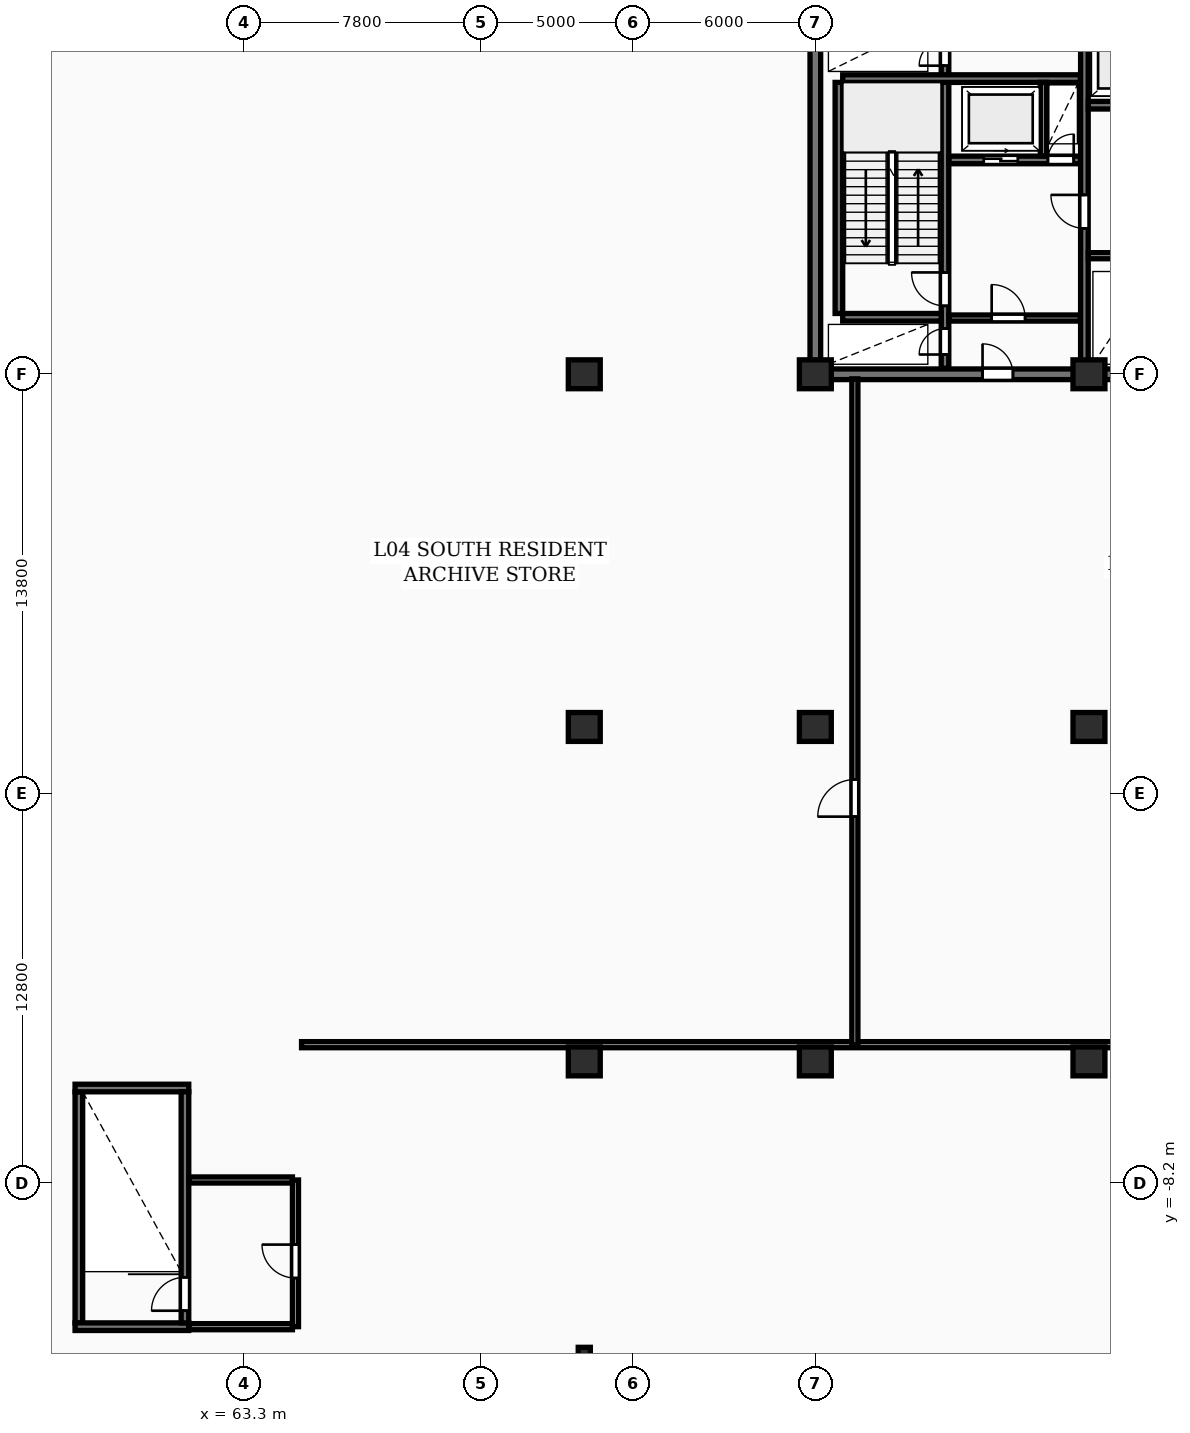
"""IFC4 building model, lengths in metres.
Left out: names, types, materials, properties, quantities, classifications, styles, units other than length and angle.
Written with IfcOpenShell. Run it as: python <this file> out.ifc"""

import sys

from ifc_helpers import new_model, si_unit, direction, frame, frame_2d, origin, origin_2d, place, context, subcontext, project, spatial, rectangle, i_section, extrude, element, fill, save


model = new_model("IFC4")
c1 = context("Model", 3, precision=1e-05, world=origin(), true_north=direction((0.0, 1.0)))
c2 = subcontext(c1, "Body", "Model", "MODEL_VIEW")
j1 = project(units=[si_unit("LENGTHUNIT", "METRE"), si_unit("PLANEANGLEUNIT", "RADIAN")], contexts=[c1])
p1 = place(None, origin())
s1 = spatial("IfcSite", under=j1, at=p1, CompositionType="ELEMENT")
p2 = place(p1, origin())
s2 = spatial("IfcBuilding", under=s1, at=p2, CompositionType="ELEMENT")
p3 = place(p2, frame((0.0, 0.0, 19.0)))
s3 = spatial("IfcBuildingStorey", under=s2, at=p3, CompositionType="ELEMENT", Elevation=19.0)
for number, where, z_axis, x_axis in (
    (1, (74.5, -4.2, 0.0), (0.0, 0.0, 1.0), (1.0, 0.0, 0.0)),
    (2, (74.5, 6.8, 0.0), (0.0, 0.0, 1.0), (1.0, 0.0, 0.0)),
    (3, (74.5, 18.4, 0.0), (0.0, 0.0, 1.0), (1.0, 0.0, 0.0)),
    (4, (82.1, -4.2, 0.0), (0.0, 0.0, 1.0), (1.0, 0.0, 0.0)),
    (5, (82.1, 6.8, 0.0), (0.0, 0.0, 1.0), (1.0, 0.0, 0.0)),
    (6, (82.1, 18.4, 0.0), (0.0, 0.0, 1.0), (1.0, 0.0, 0.0)),
    (7, (91.1, -4.2, 0.0), (0.0, 0.0, 1.0), (1.0, 0.0, 0.0)),
    (8, (91.1, 6.8, 0.0), (0.0, 0.0, 1.0), (1.0, 0.0, 0.0)),
    (9, (91.1, 18.4, 0.0), (0.0, 0.0, 1.0), (1.0, 0.0, 0.0)),
):
    element("IfcColumn", number, at=place(p3, frame(where, z_axis=z_axis, x_axis=x_axis)), inside=s3, PredefinedType="COLUMN", context=c2, shape_type="SweptSolid", body=[
        extrude(rectangle(XDim=1.05, YDim=0.95, at=origin_2d()), origin(), (0.0, 0.0, 1.0), 5.0),
    ])
p4 = place(p3, frame((74.5, -13.8, 0.0), z_axis=(0.0, 0.0, 1.0), x_axis=(1.0, 0.0, 0.0)))
e10 = element("IfcColumn", 10, at=p4, inside=s3, PredefinedType="COLUMN", context=c2, shape_type="SweptSolid", body=[
    extrude(i_section(OverallWidth=0.399, OverallDepth=0.394, WebThickness=0.023, FlangeThickness=0.037, FilletRadius=0.015, at=origin_2d()), origin(), (0.0, 0.0, 1.0), 5.0),
])
p5 = place(p3, frame((82.1, 18.575, 0.0), z_axis=(0.0, 0.0, 1.0), x_axis=(0.0, 1.0, 0.0)))
e11 = element("IfcWall", 11, at=p5, inside=s3, PredefinedType="SHEAR", context=c2, shape_type="SweptSolid", body=[
    extrude(rectangle(XDim=11.65, YDim=0.35, at=frame_2d((5.825, 0.0))), origin(), (0.0, 0.0, 1.0), 5.0),
])
p6 = place(p3, frame((81.925, 18.4, 0.0), z_axis=(0.0, 0.0, 1.0), x_axis=(1.0, 0.0, 0.0)))
e12 = element("IfcWall", 12, at=p6, inside=s3, PredefinedType="SHEAR", context=c2, shape_type="SweptSolid", body=[
    extrude(rectangle(XDim=36.265, YDim=0.35, at=frame_2d((18.132, 0.0))), origin(), (0.0, 0.0, 1.0), 5.0),
])
p7 = place(p6, frame((5.675, 0.0, 0.0)))
e13 = element("IfcOpeningElement", 13, at=p7, cuts=e12, PredefinedType="OPENING", context=c2, shape_type="SweptSolid", body=[
    extrude(rectangle(XDim=1.0, YDim=2.15, at=frame_2d((0.5, 1.075))), frame((0.0, 0.185, 0.0), z_axis=(0.0, -1.0, 0.0), x_axis=(1.0, 0.0, 0.0)), (0.0, 0.0, 1.0), 0.37),
])
p8 = place(p6, frame((21.925, 0.0, 0.0)))
e14 = element("IfcOpeningElement", 14, at=p8, cuts=e12, PredefinedType="OPENING", context=c2, shape_type="SweptSolid", body=[
    extrude(rectangle(XDim=1.5, YDim=2.2, at=frame_2d((0.75, 1.1))), frame((0.0, 0.185, 0.0), z_axis=(0.0, -1.0, 0.0), x_axis=(1.0, 0.0, 0.0)), (0.0, 0.0, 1.0), 0.37),
])
p9 = place(p6, frame((29.875, 0.0, 0.0)))
e15 = element("IfcOpeningElement", 15, at=p9, cuts=e12, PredefinedType="OPENING", context=c2, shape_type="SweptSolid", body=[
    extrude(rectangle(XDim=1.0, YDim=2.15, at=frame_2d((0.5, 1.075))), frame((0.0, 0.185, 0.0), z_axis=(0.0, -1.0, 0.0), x_axis=(1.0, 0.0, 0.0)), (0.0, 0.0, 1.0), 0.37),
])
p10 = place(p3, frame((82.875, 20.4, 0.0), z_axis=(0.0, 0.0, 1.0), x_axis=(0.0, 1.0, 0.0)))
e16 = element("IfcWall", 16, at=p10, inside=s3, PredefinedType="SHEAR", context=c2, shape_type="SweptSolid", body=[
    extrude(rectangle(XDim=7.6, YDim=0.25, at=frame_2d((3.8, 0.0))), origin(), (0.0, 0.0, 1.0), 5.0),
])
p11 = place(p3, frame((86.365, 18.6, 0.0), z_axis=(0.0, 0.0, 1.0), x_axis=(0.0, 1.0, 0.0)))
e17 = element("IfcWall", 17, at=p11, inside=s3, PredefinedType="SHEAR", context=c2, shape_type="SweptSolid", body=[
    extrude(rectangle(XDim=11.6, YDim=0.25, at=frame_2d((5.8, 0.0))), origin(), (0.0, 0.0, 1.0), 5.0),
])
p12 = place(p11, frame((0.45, 0.0, 0.0)))
e18 = element("IfcOpeningElement", 18, at=p12, cuts=e17, PredefinedType="OPENING", context=c2, shape_type="SweptSolid", body=[
    extrude(rectangle(XDim=0.85, YDim=2.05, at=frame_2d((0.425, 1.025))), frame((0.0, 0.135, 0.0), z_axis=(0.0, -1.0, 0.0), x_axis=(1.0, 0.0, 0.0)), (0.0, 0.0, 1.0), 0.27),
])
p13 = place(p11, frame((2.05, 0.0, 0.0)))
e19 = element("IfcOpeningElement", 19, at=p13, cuts=e17, PredefinedType="OPENING", context=c2, shape_type="SweptSolid", body=[
    extrude(rectangle(XDim=1.1, YDim=2.1, at=frame_2d((0.55, 1.05))), frame((0.0, 0.135, 0.0), z_axis=(0.0, -1.0, 0.0), x_axis=(1.0, 0.0, 0.0)), (0.0, 0.0, 1.0), 0.27),
])
p14 = place(p11, frame((9.95, 0.0, 0.0)))
e20 = element("IfcOpeningElement", 20, at=p14, cuts=e17, PredefinedType="OPENING", context=c2, shape_type="SweptSolid", body=[
    extrude(rectangle(XDim=0.85, YDim=2.05, at=frame_2d((0.425, 1.025))), frame((0.0, 0.135, 0.0), z_axis=(0.0, -1.0, 0.0), x_axis=(1.0, 0.0, 0.0)), (0.0, 0.0, 1.0), 0.27),
])
p15 = place(p3, frame((83.0, 20.275, 0.0), z_axis=(0.0, 0.0, 1.0), x_axis=(1.0, 0.0, 0.0)))
e21 = element("IfcWall", 21, at=p15, inside=s3, PredefinedType="SHEAR", context=c2, shape_type="SweptSolid", body=[
    extrude(rectangle(XDim=3.24, YDim=0.25, at=frame_2d((1.62, 0.0))), origin(), (0.0, 0.0, 1.0), 5.0),
])
p16 = place(p3, frame((83.0, 28.125, 0.0), z_axis=(0.0, 0.0, 1.0), x_axis=(1.0, 0.0, 0.0)))
e22 = element("IfcWall", 22, at=p16, inside=s3, PredefinedType="SHEAR", context=c2, shape_type="SweptSolid", body=[
    extrude(rectangle(XDim=7.82, YDim=0.25, at=frame_2d((3.91, 0.0))), origin(), (0.0, 0.0, 1.0), 5.0),
])
p17 = place(p3, frame((86.5, 25.45, 0.0), z_axis=(0.0, 0.0, 1.0), x_axis=(1.0, 0.0, 0.0)))
e23 = element("IfcWall", 23, at=p17, inside=s3, PredefinedType="SHEAR", context=c2, shape_type="SweptSolid", body=[
    extrude(rectangle(XDim=4.32, YDim=0.25, at=frame_2d((2.16, 0.0))), origin(), (0.0, 0.0, 1.0), 5.0),
])
p18 = place(p17, frame((1.14, 0.0, 0.0)))
e24 = element("IfcOpeningElement", 24, at=p18, cuts=e23, PredefinedType="OPENING", context=c2, shape_type="SweptSolid", body=[
    extrude(rectangle(XDim=1.12, YDim=2.12, at=frame_2d((0.56, 1.06))), frame((0.0, 0.135, 0.0), z_axis=(0.0, -1.0, 0.0), x_axis=(1.0, 0.0, 0.0)), (0.0, 0.0, 1.0), 0.27),
])
p19 = place(p17, frame((3.25, 0.0, 0.0)))
e25 = element("IfcOpeningElement", 25, at=p19, cuts=e23, PredefinedType="OPENING", context=c2, shape_type="SweptSolid", body=[
    extrude(rectangle(XDim=0.85, YDim=2.05, at=frame_2d((0.425, 1.025))), frame((0.0, 0.135, 0.0), z_axis=(0.0, -1.0, 0.0), x_axis=(1.0, 0.0, 0.0)), (0.0, 0.0, 1.0), 0.27),
])
p20 = place(p3, frame((89.6, 25.58, 0.0), z_axis=(0.0, 0.0, 1.0), x_axis=(0.0, 1.0, 0.0)))
e26 = element("IfcWall", 26, at=p20, inside=s3, PredefinedType="PARTITIONING", context=c2, shape_type="SweptSolid", body=[
    extrude(rectangle(XDim=2.42, YDim=0.2, at=frame_2d((1.21, 0.0))), origin(), (0.0, 0.0, 1.0), 4.68),
])
p21 = place(p3, frame((86.5, 20.25, 0.0), z_axis=(0.0, 0.0, 1.0), x_axis=(1.0, 0.0, 0.0)))
e27 = element("IfcWall", 27, at=p21, inside=s3, PredefinedType="PARTITIONING", context=c2, shape_type="SweptSolid", body=[
    extrude(rectangle(XDim=4.32, YDim=0.2, at=frame_2d((2.16, 0.0))), origin(), (0.0, 0.0, 1.0), 4.68),
])
p22 = place(p21, frame((1.4, 0.0, 0.0)))
e28 = element("IfcOpeningElement", 28, at=p22, cuts=e27, PredefinedType="OPENING", context=c2, shape_type="SweptSolid", body=[
    extrude(rectangle(XDim=1.1, YDim=2.1, at=frame_2d((0.55, 1.05))), frame((0.0, 0.11, 0.0), z_axis=(0.0, -1.0, 0.0), x_axis=(1.0, 0.0, 0.0)), (0.0, 0.0, 1.0), 0.22),
])
p23 = place(p3, frame((90.95, 18.6, 0.0), z_axis=(0.0, 0.0, 1.0), x_axis=(0.0, 1.0, 0.0)))
e29 = element("IfcWall", 29, at=p23, inside=s3, PredefinedType="SHEAR", context=c2, shape_type="SweptSolid", body=[
    extrude(rectangle(XDim=11.6, YDim=0.25, at=frame_2d((5.8, 0.0))), origin(), (0.0, 0.0, 1.0), 5.0),
])
p24 = place(p23, frame((4.6, 0.0, 0.0)))
e30 = element("IfcOpeningElement", 30, at=p24, cuts=e29, PredefinedType="OPENING", context=c2, shape_type="SweptSolid", body=[
    extrude(rectangle(XDim=1.1, YDim=2.1, at=frame_2d((0.55, 1.05))), frame((0.0, 0.135, 0.0), z_axis=(0.0, -1.0, 0.0), x_axis=(1.0, 0.0, 0.0)), (0.0, 0.0, 1.0), 0.27),
])
p25 = place(p3, frame((91.08, 27.25, 0.0), z_axis=(0.0, 0.0, 1.0), x_axis=(1.0, 0.0, 0.0)))
e31 = element("IfcWall", 31, at=p25, inside=s3, PredefinedType="SHEAR", context=c2, shape_type="SweptSolid", body=[
    extrude(rectangle(XDim=8.34, YDim=0.25, at=frame_2d((4.17, 0.0))), origin(), (0.0, 0.0, 1.0), 5.0),
])
p26 = place(p25, frame((0.76, 0.0, 0.0)))
e32 = element("IfcOpeningElement", 32, at=p26, cuts=e31, PredefinedType="OPENING", context=c2, shape_type="SweptSolid", body=[
    extrude(rectangle(XDim=1.12, YDim=2.12, at=frame_2d((0.56, 1.06))), frame((0.0, 0.135, 0.0), z_axis=(0.0, -1.0, 0.0), x_axis=(1.0, 0.0, 0.0)), (0.0, 0.0, 1.0), 0.27),
])
p27 = place(p25, frame((3.56, 0.0, 0.0)))
e33 = element("IfcOpeningElement", 33, at=p27, cuts=e31, PredefinedType="OPENING", context=c2, shape_type="SweptSolid", body=[
    extrude(rectangle(XDim=1.12, YDim=2.12, at=frame_2d((0.56, 1.06))), frame((0.0, 0.135, 0.0), z_axis=(0.0, -1.0, 0.0), x_axis=(1.0, 0.0, 0.0)), (0.0, 0.0, 1.0), 0.27),
])
p28 = place(p25, frame((6.36, 0.0, 0.0)))
e34 = element("IfcOpeningElement", 34, at=p28, cuts=e31, PredefinedType="OPENING", context=c2, shape_type="SweptSolid", body=[
    extrude(rectangle(XDim=1.12, YDim=2.12, at=frame_2d((0.56, 1.06))), frame((0.0, 0.135, 0.0), z_axis=(0.0, -1.0, 0.0), x_axis=(1.0, 0.0, 0.0)), (0.0, 0.0, 1.0), 0.27),
])
p29 = place(p3, frame((91.08, 22.3, 0.0), z_axis=(0.0, 0.0, 1.0), x_axis=(1.0, 0.0, 0.0)))
e35 = element("IfcWall", 35, at=p29, inside=s3, PredefinedType="PARTITIONING", context=c2, shape_type="SweptSolid", body=[
    extrude(rectangle(XDim=19.14, YDim=0.2, at=frame_2d((9.57, 0.0))), origin(), (0.0, 0.0, 1.0), 4.68),
])
p30 = place(p29, frame((1.15, 0.0, 0.0)))
e36 = element("IfcOpeningElement", 36, at=p30, cuts=e35, PredefinedType="OPENING", context=c2, shape_type="SweptSolid", body=[
    extrude(rectangle(XDim=0.85, YDim=2.05, at=frame_2d((0.425, 1.025))), frame((0.0, 0.11, 0.0), z_axis=(0.0, -1.0, 0.0), x_axis=(1.0, 0.0, 0.0)), (0.0, 0.0, 1.0), 0.22),
])
p31 = place(p29, frame((3.2, 0.0, 0.0)))
e37 = element("IfcOpeningElement", 37, at=p31, cuts=e35, PredefinedType="OPENING", context=c2, shape_type="SweptSolid", body=[
    extrude(rectangle(XDim=0.85, YDim=2.05, at=frame_2d((0.425, 1.025))), frame((0.0, 0.11, 0.0), z_axis=(0.0, -1.0, 0.0), x_axis=(1.0, 0.0, 0.0)), (0.0, 0.0, 1.0), 0.22),
])
p32 = place(p29, frame((12.72, 0.0, 0.0)))
e38 = element("IfcOpeningElement", 38, at=p32, cuts=e35, PredefinedType="OPENING", context=c2, shape_type="SweptSolid", body=[
    extrude(rectangle(XDim=1.5, YDim=2.2, at=frame_2d((0.75, 1.1))), frame((0.0, 0.11, 0.0), z_axis=(0.0, -1.0, 0.0), x_axis=(1.0, 0.0, 0.0)), (0.0, 0.0, 1.0), 0.22),
])
p33 = place(p29, frame((6.42, 0.0, 0.0)))
e39 = element("IfcOpeningElement", 39, at=p33, cuts=e35, PredefinedType="OPENING", context=c2, shape_type="SweptSolid", body=[
    extrude(rectangle(XDim=0.92, YDim=2.08, at=frame_2d((0.46, 1.04))), frame((0.0, 0.11, 0.0), z_axis=(0.0, -1.0, 0.0), x_axis=(1.0, 0.0, 0.0)), (0.0, 0.0, 1.0), 0.22),
])
p34 = place(p29, frame((15.92, 0.0, 0.0)))
e40 = element("IfcOpeningElement", 40, at=p34, cuts=e35, PredefinedType="OPENING", context=c2, shape_type="SweptSolid", body=[
    extrude(rectangle(XDim=0.88, YDim=2.06, at=frame_2d((0.44, 1.03))), frame((0.0, 0.11, 0.0), z_axis=(0.0, -1.0, 0.0), x_axis=(1.0, 0.0, 0.0)), (0.0, 0.0, 1.0), 0.22),
])
p35 = place(p3, frame((57.875, -12.8, 0.0), z_axis=(0.0, 0.0, 1.0), x_axis=(0.0, 1.0, 0.0)))
e41 = element("IfcWall", 41, at=p35, inside=s3, PredefinedType="SHEAR", context=c2, shape_type="SweptSolid", body=[
    extrude(rectangle(XDim=7.6, YDim=0.25, at=frame_2d((3.8, 0.0))), origin(), (0.0, 0.0, 1.0), 5.0),
])
for number, where, z_axis, x_axis in (
    (42, (57.75, -12.925, 0.0), (0.0, 0.0, 1.0), (1.0, 0.0, 0.0)),
    (43, (57.75, -5.075, 0.0), (0.0, 0.0, 1.0), (1.0, 0.0, 0.0)),
):
    element("IfcWall", number, at=place(p3, frame(where, z_axis=z_axis, x_axis=x_axis)), inside=s3, PredefinedType="SHEAR", context=c2, shape_type="SweptSolid", body=[
        extrude(rectangle(XDim=3.74, YDim=0.25, at=frame_2d((1.87, 0.0))), origin(), (0.0, 0.0, 1.0), 5.0),
    ])
p36 = place(p3, frame((61.365, -12.8, 0.0), z_axis=(0.0, 0.0, 1.0), x_axis=(0.0, 1.0, 0.0)))
e44 = element("IfcWall", 44, at=p36, inside=s3, PredefinedType="SHEAR", context=c2, shape_type="SweptSolid", body=[
    extrude(rectangle(XDim=7.6, YDim=0.25, at=frame_2d((3.8, 0.0))), origin(), (0.0, 0.0, 1.0), 5.0),
])
p37 = place(p36, frame((0.4, 0.0, 0.0)))
e45 = element("IfcOpeningElement", 45, at=p37, cuts=e44, PredefinedType="OPENING", context=c2, shape_type="SweptSolid", body=[
    extrude(rectangle(XDim=1.1, YDim=2.1, at=frame_2d((0.55, 1.05))), frame((0.0, 0.135, 0.0), z_axis=(0.0, -1.0, 0.0), x_axis=(1.0, 0.0, 0.0)), (0.0, 0.0, 1.0), 0.27),
])
p38 = place(p3, frame((65.0, -12.925, 0.0), z_axis=(0.0, 0.0, 1.0), x_axis=(0.0, 1.0, 0.0)))
e46 = element("IfcWall", 46, at=p38, inside=s3, PredefinedType="PARTITIONING", context=c2, shape_type="SweptSolid", body=[
    extrude(rectangle(XDim=4.825, YDim=0.2, at=frame_2d((2.413, 0.0))), origin(), (0.0, 0.0, 1.0), 4.68),
])
p39 = place(p38, frame((1.6, 0.0, 0.0)))
e47 = element("IfcOpeningElement", 47, at=p39, cuts=e46, PredefinedType="OPENING", context=c2, shape_type="SweptSolid", body=[
    extrude(rectangle(XDim=1.1, YDim=2.15, at=frame_2d((0.55, 1.075))), frame((0.0, 0.11, 0.0), z_axis=(0.0, -1.0, 0.0), x_axis=(1.0, 0.0, 0.0)), (0.0, 0.0, 1.0), 0.22),
])
for number, where, z_axis, x_axis in (
    (48, (61.5, -12.925, 0.0), (0.0, 0.0, 1.0), (1.0, 0.0, 0.0)),
    (49, (61.5, -8.1, 0.0), (0.0, 0.0, 1.0), (1.0, 0.0, 0.0)),
):
    element("IfcWall", number, at=place(p3, frame(where, z_axis=z_axis, x_axis=x_axis)), inside=s3, PredefinedType="PARTITIONING", context=c2, shape_type="SweptSolid", body=[
        extrude(rectangle(XDim=3.4, YDim=0.2, at=frame_2d((1.7, 0.0))), origin(), (0.0, 0.0, 1.0), 4.68),
    ])
p40 = place(p3, frame((65.2, -3.65, 0.0), z_axis=(0.0, 0.0, 1.0), x_axis=(1.0, 0.0, 0.0)))
e50 = element("IfcWall", 50, at=p40, inside=s3, PredefinedType="PARTITIONING", context=c2, shape_type="SweptSolid", body=[
    extrude(rectangle(XDim=60.3, YDim=0.2, at=frame_2d((30.15, 0.0))), origin(), (0.0, 0.0, 1.0), 3.53),
])
p41 = place(p3, frame((83.4, -3.65, 0.0), z_axis=(0.0, 0.0, 1.0), x_axis=(0.0, 1.0, 0.0)))
e51 = element("IfcWall", 51, at=p41, inside=s3, PredefinedType="PARTITIONING", context=c2, shape_type="SweptSolid", body=[
    extrude(rectangle(XDim=21.9, YDim=0.2, at=frame_2d((10.95, 0.0))), origin(), (0.0, 0.0, 1.0), 4.68),
])
p42 = place(p41, frame((7.501, 0.0, 0.0)))
e52 = element("IfcOpeningElement", 52, at=p42, cuts=e51, PredefinedType="OPENING", context=c2, shape_type="SweptSolid", body=[
    extrude(rectangle(XDim=1.22, YDim=2.18, at=frame_2d((0.61, 1.09))), frame((0.0, 0.11, 0.0), z_axis=(0.0, -1.0, 0.0), x_axis=(1.0, 0.0, 0.0)), (0.0, 0.0, 1.0), 0.22),
])
p43 = place(p7, origin())
e53 = element("IfcDoor", 53, at=p43, inside=s3, OperationType="SINGLE_SWING_LEFT", PredefinedType="DOOR", context=c2, shape_type="SweptSolid", body=[
    extrude(rectangle(XDim=1.0, YDim=2.15, at=frame_2d((0.5, 1.075))), frame((0.0, 0.025, 0.0), z_axis=(0.0, -1.0, 0.0), x_axis=(1.0, 0.0, 0.0)), (0.0, 0.0, 1.0), 0.05),
])
fill(e13, e53)
p44 = place(p12, origin())
e54 = element("IfcDoor", 54, at=p44, inside=s3, OperationType="SINGLE_SWING_LEFT", PredefinedType="DOOR", context=c2, shape_type="SweptSolid", body=[
    extrude(rectangle(XDim=0.85, YDim=2.05, at=frame_2d((0.425, 1.025))), frame((0.0, 0.025, 0.0), z_axis=(0.0, -1.0, 0.0), x_axis=(1.0, 0.0, 0.0)), (0.0, 0.0, 1.0), 0.05),
])
fill(e18, e54)
p45 = place(p13, origin())
e55 = element("IfcDoor", 55, at=p45, inside=s3, OperationType="SINGLE_SWING_RIGHT", PredefinedType="DOOR", context=c2, shape_type="SweptSolid", body=[
    extrude(rectangle(XDim=1.1, YDim=2.1, at=frame_2d((0.55, 1.05))), frame((0.0, 0.025, 0.0), z_axis=(0.0, -1.0, 0.0), x_axis=(1.0, 0.0, 0.0)), (0.0, 0.0, 1.0), 0.05),
])
fill(e19, e55)
p46 = place(p14, origin())
e56 = element("IfcDoor", 56, at=p46, inside=s3, OperationType="SINGLE_SWING_LEFT", PredefinedType="DOOR", context=c2, shape_type="SweptSolid", body=[
    extrude(rectangle(XDim=0.85, YDim=2.05, at=frame_2d((0.425, 1.025))), frame((0.0, 0.025, 0.0), z_axis=(0.0, -1.0, 0.0), x_axis=(1.0, 0.0, 0.0)), (0.0, 0.0, 1.0), 0.05),
])
fill(e20, e56)
p47 = place(p18, origin())
e57 = element("IfcDoor", 57, at=p47, inside=s3, OperationType="SLIDING_TO_RIGHT", PredefinedType="DOOR", context=c2, shape_type="SweptSolid", body=[
    extrude(rectangle(XDim=1.12, YDim=2.12, at=frame_2d((0.56, 1.06))), frame((0.0, 0.025, 0.0), z_axis=(0.0, -1.0, 0.0), x_axis=(1.0, 0.0, 0.0)), (0.0, 0.0, 1.0), 0.05),
])
fill(e24, e57)
p48 = place(p19, origin())
e58 = element("IfcDoor", 58, at=p48, inside=s3, OperationType="SINGLE_SWING_RIGHT", PredefinedType="DOOR", context=c2, shape_type="SweptSolid", body=[
    extrude(rectangle(XDim=0.85, YDim=2.05, at=frame_2d((0.425, 1.025))), frame((0.0, 0.025, 0.0), z_axis=(0.0, -1.0, 0.0), x_axis=(1.0, 0.0, 0.0)), (0.0, 0.0, 1.0), 0.05),
])
fill(e25, e58)
p49 = place(p22, origin())
e59 = element("IfcDoor", 59, at=p49, inside=s3, OperationType="SINGLE_SWING_LEFT", PredefinedType="DOOR", context=c2, shape_type="SweptSolid", body=[
    extrude(rectangle(XDim=1.1, YDim=2.1, at=frame_2d((0.55, 1.05))), frame((0.0, 0.025, 0.0), z_axis=(0.0, -1.0, 0.0), x_axis=(1.0, 0.0, 0.0)), (0.0, 0.0, 1.0), 0.05),
])
fill(e28, e59)
p50 = place(p24, origin())
e60 = element("IfcDoor", 60, at=p50, inside=s3, OperationType="SINGLE_SWING_RIGHT", PredefinedType="DOOR", context=c2, shape_type="SweptSolid", body=[
    extrude(rectangle(XDim=1.1, YDim=2.1, at=frame_2d((0.55, 1.05))), frame((0.0, 0.025, 0.0), z_axis=(0.0, -1.0, 0.0), x_axis=(1.0, 0.0, 0.0)), (0.0, 0.0, 1.0), 0.05),
])
fill(e30, e60)
p51 = place(p37, origin())
e61 = element("IfcDoor", 61, at=p51, inside=s3, OperationType="SINGLE_SWING_LEFT", PredefinedType="DOOR", context=c2, shape_type="SweptSolid", body=[
    extrude(rectangle(XDim=1.1, YDim=2.1, at=frame_2d((0.55, 1.05))), frame((0.0, 0.025, 0.0), z_axis=(0.0, -1.0, 0.0), x_axis=(1.0, 0.0, 0.0)), (0.0, 0.0, 1.0), 0.05),
])
fill(e45, e61)
p52 = place(p39, origin())
e62 = element("IfcDoor", 62, at=p52, inside=s3, OperationType="SINGLE_SWING_RIGHT", PredefinedType="DOOR", context=c2, shape_type="SweptSolid", body=[
    extrude(rectangle(XDim=1.1, YDim=2.15, at=frame_2d((0.55, 1.075))), frame((0.0, 0.025, 0.0), z_axis=(0.0, -1.0, 0.0), x_axis=(1.0, 0.0, 0.0)), (0.0, 0.0, 1.0), 0.05),
])
fill(e47, e62)
p53 = place(p42, origin())
e63 = element("IfcDoor", 63, at=p53, inside=s3, OperationType="SINGLE_SWING_LEFT", PredefinedType="DOOR", context=c2, shape_type="SweptSolid", body=[
    extrude(rectangle(XDim=1.22, YDim=2.18, at=frame_2d((0.61, 1.09))), frame((0.0, 0.025, 0.0), z_axis=(0.0, -1.0, 0.0), x_axis=(1.0, 0.0, 0.0)), (0.0, 0.0, 1.0), 0.05),
])
fill(e52, e63)
save(model, sys.argv[1])
